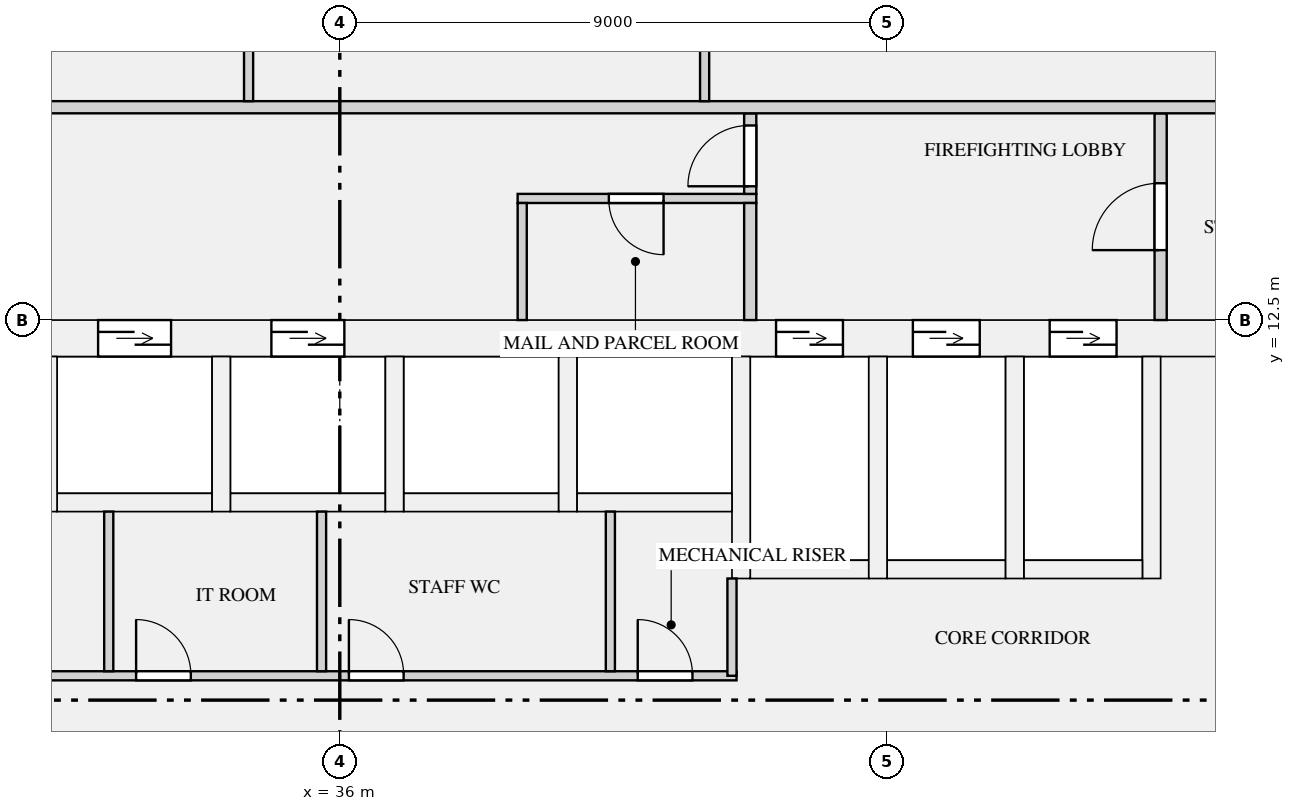
"""IFC4 building model, lengths in metres.
Left out: names, types, materials, properties, quantities, classifications, styles, units other than length and angle.
Written with IfcOpenShell. Run it as: python <this file> out.ifc"""

import sys

from ifc_helpers import new_model, si_unit, direction, frame, frame_2d, origin, place, context, subcontext, project, spatial, rectangle, extrude, element, fill, save


model = new_model("IFC4")
c1 = context("Model", 3, precision=1e-05, world=origin(), true_north=direction((0.0, 1.0)))
c2 = subcontext(c1, "Body", "Model", "MODEL_VIEW")
j1 = project(units=[si_unit("LENGTHUNIT", "METRE"), si_unit("PLANEANGLEUNIT", "RADIAN")], contexts=[c1])
p1 = place(None, origin())
s1 = spatial("IfcSite", under=j1, at=p1, CompositionType="ELEMENT")
p2 = place(p1, origin())
s2 = spatial("IfcBuilding", under=s1, at=p2, CompositionType="ELEMENT")
p3 = place(p2, frame((0.0, 0.0, 69.9)))
s3 = spatial("IfcBuildingStorey", under=s2, at=p3, CompositionType="ELEMENT", Elevation=69.9)
p4 = place(p3, frame((19.0, 12.2, 0.0), z_axis=(0.0, 0.0, 1.0), x_axis=(1.0, 0.0, 0.0)))
e1 = element("IfcWall", 1, at=p4, inside=s3, PredefinedType="SHEAR", context=c2, shape_type="SweptSolid", body=[
    extrude(rectangle(XDim=34.0, YDim=0.6, at=frame_2d((17.0, 0.0))), origin(), (0.0, 0.0, 1.0), 3.15),
])
p5 = place(p4, frame((4.475, 0.0, 0.0)))
e2 = element("IfcOpeningElement", 2, at=p5, cuts=e1, PredefinedType="OPENING", context=c2, shape_type="SweptSolid", body=[
    extrude(rectangle(XDim=1.2, YDim=2.1, at=frame_2d((0.6, 1.05))), frame((0.0, 0.31, 0.0), z_axis=(0.0, -1.0, 0.0), x_axis=(1.0, 0.0, 0.0)), (0.0, 0.0, 1.0), 0.62),
])
p6 = place(p4, frame((7.325, 0.0, 0.0)))
e3 = element("IfcOpeningElement", 3, at=p6, cuts=e1, PredefinedType="OPENING", context=c2, shape_type="SweptSolid", body=[
    extrude(rectangle(XDim=1.2, YDim=2.1, at=frame_2d((0.6, 1.05))), frame((0.0, 0.31, 0.0), z_axis=(0.0, -1.0, 0.0), x_axis=(1.0, 0.0, 0.0)), (0.0, 0.0, 1.0), 0.62),
])
p7 = place(p4, frame((10.175, 0.0, 0.0)))
e4 = element("IfcOpeningElement", 4, at=p7, cuts=e1, PredefinedType="OPENING", context=c2, shape_type="SweptSolid", body=[
    extrude(rectangle(XDim=1.2, YDim=2.1, at=frame_2d((0.6, 1.05))), frame((0.0, 0.31, 0.0), z_axis=(0.0, -1.0, 0.0), x_axis=(1.0, 0.0, 0.0)), (0.0, 0.0, 1.0), 0.62),
])
p8 = place(p4, frame((13.025, 0.0, 0.0)))
e5 = element("IfcOpeningElement", 5, at=p8, cuts=e1, PredefinedType="OPENING", context=c2, shape_type="SweptSolid", body=[
    extrude(rectangle(XDim=1.2, YDim=2.1, at=frame_2d((0.6, 1.05))), frame((0.0, 0.31, 0.0), z_axis=(0.0, -1.0, 0.0), x_axis=(1.0, 0.0, 0.0)), (0.0, 0.0, 1.0), 0.62),
])
p9 = place(p4, frame((15.875, 0.0, 0.0)))
e6 = element("IfcOpeningElement", 6, at=p9, cuts=e1, PredefinedType="OPENING", context=c2, shape_type="SweptSolid", body=[
    extrude(rectangle(XDim=1.2, YDim=2.1, at=frame_2d((0.6, 1.05))), frame((0.0, 0.31, 0.0), z_axis=(0.0, -1.0, 0.0), x_axis=(1.0, 0.0, 0.0)), (0.0, 0.0, 1.0), 0.62),
])
p10 = place(p4, frame((24.175, 0.0, 0.0)))
e7 = element("IfcOpeningElement", 7, at=p10, cuts=e1, PredefinedType="OPENING", context=c2, shape_type="SweptSolid", body=[
    extrude(rectangle(XDim=1.1, YDim=2.1, at=frame_2d((0.55, 1.05))), frame((0.0, 0.31, 0.0), z_axis=(0.0, -1.0, 0.0), x_axis=(1.0, 0.0, 0.0)), (0.0, 0.0, 1.0), 0.62),
])
p11 = place(p4, frame((26.425, 0.0, 0.0)))
e8 = element("IfcOpeningElement", 8, at=p11, cuts=e1, PredefinedType="OPENING", context=c2, shape_type="SweptSolid", body=[
    extrude(rectangle(XDim=1.1, YDim=2.1, at=frame_2d((0.55, 1.05))), frame((0.0, 0.31, 0.0), z_axis=(0.0, -1.0, 0.0), x_axis=(1.0, 0.0, 0.0)), (0.0, 0.0, 1.0), 0.62),
])
p12 = place(p4, frame((28.675, 0.0, 0.0)))
e9 = element("IfcOpeningElement", 9, at=p12, cuts=e1, PredefinedType="OPENING", context=c2, shape_type="SweptSolid", body=[
    extrude(rectangle(XDim=1.1, YDim=2.1, at=frame_2d((0.55, 1.05))), frame((0.0, 0.31, 0.0), z_axis=(0.0, -1.0, 0.0), x_axis=(1.0, 0.0, 0.0)), (0.0, 0.0, 1.0), 0.62),
])
p13 = place(p4, frame((1.15, 0.0, 0.0)))
e10 = element("IfcOpeningElement", 10, at=p13, cuts=e1, PredefinedType="OPENING", context=c2, shape_type="SweptSolid", body=[
    extrude(rectangle(XDim=1.2, YDim=2.1, at=frame_2d((0.6, 1.05))), frame((0.0, 0.31, 0.0), z_axis=(0.0, -1.0, 0.0), x_axis=(1.0, 0.0, 0.0)), (0.0, 0.0, 1.0), 0.62),
])
p14 = place(p4, frame((31.65, 0.0, 0.0)))
e11 = element("IfcOpeningElement", 11, at=p14, cuts=e1, PredefinedType="OPENING", context=c2, shape_type="SweptSolid", body=[
    extrude(rectangle(XDim=1.2, YDim=2.1, at=frame_2d((0.6, 1.05))), frame((0.0, 0.31, 0.0), z_axis=(0.0, -1.0, 0.0), x_axis=(1.0, 0.0, 0.0)), (0.0, 0.0, 1.0), 0.62),
])
for number, where, z_axis, x_axis in (
    (12, (31.35, 9.5, 0.0), (0.0, 0.0, 1.0), (1.0, 0.0, 0.0)),
    (13, (31.2, 9.35, 0.0), (0.0, 0.0, 1.0), (0.0, 1.0, 0.0)),
):
    element("IfcWall", number, at=place(p3, frame(where, z_axis=z_axis, x_axis=x_axis)), inside=s3, PredefinedType="SHEAR", context=c2, shape_type="SweptSolid", body=[
        extrude(rectangle(XDim=2.55, YDim=0.3, at=frame_2d((1.275, 0.0))), origin(), (0.0, 0.0, 1.0), 3.15),
    ])
p15 = place(p3, frame((34.2, 9.5, 0.0), z_axis=(0.0, 0.0, 1.0), x_axis=(1.0, 0.0, 0.0)))
e14 = element("IfcWall", 14, at=p15, inside=s3, PredefinedType="SHEAR", context=c2, shape_type="SweptSolid", body=[
    extrude(rectangle(XDim=2.55, YDim=0.3, at=frame_2d((1.275, 0.0))), origin(), (0.0, 0.0, 1.0), 3.15),
])
p16 = place(p3, frame((34.05, 9.35, 0.0), z_axis=(0.0, 0.0, 1.0), x_axis=(0.0, 1.0, 0.0)))
e15 = element("IfcWall", 15, at=p16, inside=s3, PredefinedType="SHEAR", context=c2, shape_type="SweptSolid", body=[
    extrude(rectangle(XDim=2.55, YDim=0.3, at=frame_2d((1.275, 0.0))), origin(), (0.0, 0.0, 1.0), 3.15),
])
p17 = place(p3, frame((37.05, 9.5, 0.0), z_axis=(0.0, 0.0, 1.0), x_axis=(1.0, 0.0, 0.0)))
e16 = element("IfcWall", 16, at=p17, inside=s3, PredefinedType="SHEAR", context=c2, shape_type="SweptSolid", body=[
    extrude(rectangle(XDim=2.55, YDim=0.3, at=frame_2d((1.275, 0.0))), origin(), (0.0, 0.0, 1.0), 3.15),
])
p18 = place(p3, frame((36.9, 9.35, 0.0), z_axis=(0.0, 0.0, 1.0), x_axis=(0.0, 1.0, 0.0)))
e17 = element("IfcWall", 17, at=p18, inside=s3, PredefinedType="SHEAR", context=c2, shape_type="SweptSolid", body=[
    extrude(rectangle(XDim=2.55, YDim=0.3, at=frame_2d((1.275, 0.0))), origin(), (0.0, 0.0, 1.0), 3.15),
])
p19 = place(p3, frame((39.9, 9.5, 0.0), z_axis=(0.0, 0.0, 1.0), x_axis=(1.0, 0.0, 0.0)))
e18 = element("IfcWall", 18, at=p19, inside=s3, PredefinedType="SHEAR", context=c2, shape_type="SweptSolid", body=[
    extrude(rectangle(XDim=2.55, YDim=0.3, at=frame_2d((1.275, 0.0))), origin(), (0.0, 0.0, 1.0), 3.15),
])
p20 = place(p3, frame((39.75, 9.35, 0.0), z_axis=(0.0, 0.0, 1.0), x_axis=(0.0, 1.0, 0.0)))
e19 = element("IfcWall", 19, at=p20, inside=s3, PredefinedType="SHEAR", context=c2, shape_type="SweptSolid", body=[
    extrude(rectangle(XDim=2.55, YDim=0.3, at=frame_2d((1.275, 0.0))), origin(), (0.0, 0.0, 1.0), 3.15),
])
p21 = place(p3, frame((42.75, 8.4, 0.0), z_axis=(0.0, 0.0, 1.0), x_axis=(1.0, 0.0, 0.0)))
e20 = element("IfcWall", 20, at=p21, inside=s3, PredefinedType="SHEAR", context=c2, shape_type="SweptSolid", body=[
    extrude(rectangle(XDim=1.95, YDim=0.3, at=frame_2d((0.975, 0.0))), origin(), (0.0, 0.0, 1.0), 3.15),
])
p22 = place(p3, frame((42.6, 8.25, 0.0), z_axis=(0.0, 0.0, 1.0), x_axis=(0.0, 1.0, 0.0)))
e21 = element("IfcWall", 21, at=p22, inside=s3, PredefinedType="SHEAR", context=c2, shape_type="SweptSolid", body=[
    extrude(rectangle(XDim=3.65, YDim=0.3, at=frame_2d((1.825, 0.0))), origin(), (0.0, 0.0, 1.0), 3.15),
])
p23 = place(p3, frame((45.0, 8.4, 0.0), z_axis=(0.0, 0.0, 1.0), x_axis=(1.0, 0.0, 0.0)))
e22 = element("IfcWall", 22, at=p23, inside=s3, PredefinedType="SHEAR", context=c2, shape_type="SweptSolid", body=[
    extrude(rectangle(XDim=1.95, YDim=0.3, at=frame_2d((0.975, 0.0))), origin(), (0.0, 0.0, 1.0), 3.15),
])
p24 = place(p3, frame((44.85, 8.25, 0.0), z_axis=(0.0, 0.0, 1.0), x_axis=(0.0, 1.0, 0.0)))
e23 = element("IfcWall", 23, at=p24, inside=s3, PredefinedType="SHEAR", context=c2, shape_type="SweptSolid", body=[
    extrude(rectangle(XDim=3.65, YDim=0.3, at=frame_2d((1.825, 0.0))), origin(), (0.0, 0.0, 1.0), 3.15),
])
p25 = place(p3, frame((47.25, 8.4, 0.0), z_axis=(0.0, 0.0, 1.0), x_axis=(1.0, 0.0, 0.0)))
e24 = element("IfcWall", 24, at=p25, inside=s3, PredefinedType="SHEAR", context=c2, shape_type="SweptSolid", body=[
    extrude(rectangle(XDim=1.95, YDim=0.3, at=frame_2d((0.975, 0.0))), origin(), (0.0, 0.0, 1.0), 3.15),
])
for number, where, z_axis, x_axis in (
    (25, (47.1, 8.25, 0.0), (0.0, 0.0, 1.0), (0.0, 1.0, 0.0)),
    (26, (49.35, 8.25, 0.0), (0.0, 0.0, 1.0), (0.0, 1.0, 0.0)),
):
    element("IfcWall", number, at=place(p3, frame(where, z_axis=z_axis, x_axis=x_axis)), inside=s3, PredefinedType="SHEAR", context=c2, shape_type="SweptSolid", body=[
        extrude(rectangle(XDim=3.65, YDim=0.3, at=frame_2d((1.825, 0.0))), origin(), (0.0, 0.0, 1.0), 3.15),
    ])
p26 = place(p3, frame((22.125, 6.65, 0.0), z_axis=(0.0, 0.0, 1.0), x_axis=(1.0, 0.0, 0.0)))
e27 = element("IfcWall", 27, at=p26, inside=s3, PredefinedType="PARTITIONING", context=c2, shape_type="SweptSolid", body=[
    extrude(rectangle(XDim=20.4, YDim=0.15, at=frame_2d((10.2, 0.0))), origin(), (0.0, 0.0, 1.0), 2.65),
])
p27 = place(p26, frame((0.525, 0.0, 0.0)))
e28 = element("IfcOpeningElement", 28, at=p27, cuts=e27, PredefinedType="OPENING", context=c2, shape_type="SweptSolid", body=[
    extrude(rectangle(XDim=0.9, YDim=2.1, at=frame_2d((0.45, 1.05))), frame((0.0, 0.085, 0.0), z_axis=(0.0, -1.0, 0.0), x_axis=(1.0, 0.0, 0.0)), (0.0, 0.0, 1.0), 0.17),
])
p28 = place(p26, frame((5.025, 0.0, 0.0)))
e29 = element("IfcOpeningElement", 29, at=p28, cuts=e27, PredefinedType="OPENING", context=c2, shape_type="SweptSolid", body=[
    extrude(rectangle(XDim=0.9, YDim=2.1, at=frame_2d((0.45, 1.05))), frame((0.0, 0.085, 0.0), z_axis=(0.0, -1.0, 0.0), x_axis=(1.0, 0.0, 0.0)), (0.0, 0.0, 1.0), 0.17),
])
p29 = place(p26, frame((10.525, 0.0, 0.0)))
e30 = element("IfcOpeningElement", 30, at=p29, cuts=e27, PredefinedType="OPENING", context=c2, shape_type="SweptSolid", body=[
    extrude(rectangle(XDim=0.9, YDim=2.1, at=frame_2d((0.45, 1.05))), frame((0.0, 0.085, 0.0), z_axis=(0.0, -1.0, 0.0), x_axis=(1.0, 0.0, 0.0)), (0.0, 0.0, 1.0), 0.17),
])
p30 = place(p26, frame((14.025, 0.0, 0.0)))
e31 = element("IfcOpeningElement", 31, at=p30, cuts=e27, PredefinedType="OPENING", context=c2, shape_type="SweptSolid", body=[
    extrude(rectangle(XDim=0.9, YDim=2.1, at=frame_2d((0.45, 1.05))), frame((0.0, 0.085, 0.0), z_axis=(0.0, -1.0, 0.0), x_axis=(1.0, 0.0, 0.0)), (0.0, 0.0, 1.0), 0.17),
])
p31 = place(p26, frame((18.775, 0.0, 0.0)))
e32 = element("IfcOpeningElement", 32, at=p31, cuts=e27, PredefinedType="OPENING", context=c2, shape_type="SweptSolid", body=[
    extrude(rectangle(XDim=0.9, YDim=2.1, at=frame_2d((0.45, 1.05))), frame((0.0, 0.085, 0.0), z_axis=(0.0, -1.0, 0.0), x_axis=(1.0, 0.0, 0.0)), (0.0, 0.0, 1.0), 0.17),
])
p32 = place(p3, frame((38.925, 14.5, 0.0), z_axis=(0.0, 0.0, 1.0), x_axis=(1.0, 0.0, 0.0)))
e33 = element("IfcWall", 33, at=p32, inside=s3, PredefinedType="PARTITIONING", context=c2, shape_type="SweptSolid", body=[
    extrude(rectangle(XDim=3.925, YDim=0.15, at=frame_2d((1.962, 0.0))), origin(), (0.0, 0.0, 1.0), 2.65),
])
p33 = place(p32, frame((1.5, 0.0, 0.0)))
e34 = element("IfcOpeningElement", 34, at=p33, cuts=e33, PredefinedType="OPENING", context=c2, shape_type="SweptSolid", body=[
    extrude(rectangle(XDim=0.9, YDim=2.1, at=frame_2d((0.45, 1.05))), frame((0.0, 0.085, 0.0), z_axis=(0.0, -1.0, 0.0), x_axis=(1.0, 0.0, 0.0)), (0.0, 0.0, 1.0), 0.17),
])
p34 = place(p3, frame((42.45, 6.65, 0.0), z_axis=(0.0, 0.0, 1.0), x_axis=(0.0, 1.0, 0.0)))
e35 = element("IfcWall", 35, at=p34, inside=s3, PredefinedType="PARTITIONING", context=c2, shape_type="SweptSolid", body=[
    extrude(rectangle(XDim=1.6, YDim=0.15, at=frame_2d((0.8, 0.0))), origin(), (0.0, 0.0, 1.0), 2.65),
])
for number, where, z_axis, x_axis in (
    (36, (32.2, 6.725, 0.0), (0.0, 0.0, 1.0), (0.0, 1.0, 0.0)),
    (37, (35.7, 6.725, 0.0), (0.0, 0.0, 1.0), (0.0, 1.0, 0.0)),
    (38, (40.45, 6.725, 0.0), (0.0, 0.0, 1.0), (0.0, 1.0, 0.0)),
):
    element("IfcWall", number, at=place(p3, frame(where, z_axis=z_axis, x_axis=x_axis)), inside=s3, PredefinedType="PARTITIONING", context=c2, shape_type="SweptSolid", body=[
        extrude(rectangle(XDim=2.625, YDim=0.15, at=frame_2d((1.312, 0.0))), origin(), (0.0, 0.0, 1.0), 2.65),
    ])
p35 = place(p3, frame((39.0, 12.5, 0.0), z_axis=(0.0, 0.0, 1.0), x_axis=(0.0, 1.0, 0.0)))
e39 = element("IfcWall", 39, at=p35, inside=s3, PredefinedType="PARTITIONING", context=c2, shape_type="SweptSolid", body=[
    extrude(rectangle(XDim=1.925, YDim=0.15, at=frame_2d((0.962, 0.0))), origin(), (0.0, 0.0, 1.0), 2.65),
])
p36 = place(p3, frame((42.75, 12.5, 0.0), z_axis=(0.0, 0.0, 1.0), x_axis=(0.0, 1.0, 0.0)))
e40 = element("IfcWall", 40, at=p36, inside=s3, PredefinedType="PARTITIONING", context=c2, shape_type="SweptSolid", body=[
    extrude(rectangle(XDim=1.925, YDim=0.2, at=frame_2d((0.962, 0.0))), origin(), (0.0, 0.0, 1.0), 2.65),
])
p37 = place(p3, frame((49.5, 12.5, 0.0), z_axis=(0.0, 0.0, 1.0), x_axis=(0.0, 1.0, 0.0)))
e41 = element("IfcWall", 41, at=p37, inside=s3, PredefinedType="PARTITIONING", context=c2, shape_type="SweptSolid", body=[
    extrude(rectangle(XDim=3.4, YDim=0.2, at=frame_2d((1.7, 0.0))), origin(), (0.0, 0.0, 1.0), 2.65),
])
p38 = place(p37, frame((1.15, 0.0, 0.0)))
e42 = element("IfcOpeningElement", 42, at=p38, cuts=e41, PredefinedType="OPENING", context=c2, shape_type="SweptSolid", body=[
    extrude(rectangle(XDim=1.1, YDim=2.1, at=frame_2d((0.55, 1.05))), frame((0.0, 0.11, 0.0), z_axis=(0.0, -1.0, 0.0), x_axis=(1.0, 0.0, 0.0)), (0.0, 0.0, 1.0), 0.22),
])
p39 = place(p3, frame((42.75, 14.575, 0.0), z_axis=(0.0, 0.0, 1.0), x_axis=(0.0, 1.0, 0.0)))
e43 = element("IfcWall", 43, at=p39, inside=s3, PredefinedType="PARTITIONING", context=c2, shape_type="SweptSolid", body=[
    extrude(rectangle(XDim=1.325, YDim=0.2, at=frame_2d((0.663, 0.0))), origin(), (0.0, 0.0, 1.0), 2.65),
])
p40 = place(p39, frame((0.125, 0.0, 0.0)))
e44 = element("IfcOpeningElement", 44, at=p40, cuts=e43, PredefinedType="OPENING", context=c2, shape_type="SweptSolid", body=[
    extrude(rectangle(XDim=1.0, YDim=2.1, at=frame_2d((0.5, 1.05))), frame((0.0, 0.11, 0.0), z_axis=(0.0, -1.0, 0.0), x_axis=(1.0, 0.0, 0.0)), (0.0, 0.0, 1.0), 0.22),
])
p41 = place(p3, frame((17.9, 16.0, 0.0), z_axis=(0.0, 0.0, 1.0), x_axis=(1.0, 0.0, 0.0)))
e45 = element("IfcWall", 45, at=p41, inside=s3, PredefinedType="PARTITIONING", context=c2, shape_type="SweptSolid", body=[
    extrude(rectangle(XDim=36.2, YDim=0.2, at=frame_2d((18.1, 0.0))), origin(), (0.0, 0.0, 1.0), 2.65),
])
p42 = place(p41, frame((0.9, 0.0, 0.0)))
e46 = element("IfcOpeningElement", 46, at=p42, cuts=e45, PredefinedType="OPENING", context=c2, shape_type="SweptSolid", body=[
    extrude(rectangle(XDim=1.4, YDim=2.1, at=frame_2d((0.7, 1.05))), frame((0.0, 0.11, 0.0), z_axis=(0.0, -1.0, 0.0), x_axis=(1.0, 0.0, 0.0)), (0.0, 0.0, 1.0), 0.22),
])
p43 = place(p41, frame((33.9, 0.0, 0.0)))
e47 = element("IfcOpeningElement", 47, at=p43, cuts=e45, PredefinedType="OPENING", context=c2, shape_type="SweptSolid", body=[
    extrude(rectangle(XDim=1.4, YDim=2.1, at=frame_2d((0.7, 1.05))), frame((0.0, 0.11, 0.0), z_axis=(0.0, -1.0, 0.0), x_axis=(1.0, 0.0, 0.0)), (0.0, 0.0, 1.0), 0.22),
])
for number, where, z_axis, x_axis in (
    (48, (34.5, 16.1, 0.0), (0.0, 0.0, 1.0), (0.0, 1.0, 0.0)),
    (49, (42.0, 16.1, 0.0), (0.0, 0.0, 1.0), (0.0, 1.0, 0.0)),
):
    element("IfcWall", number, at=place(p3, frame(where, z_axis=z_axis, x_axis=x_axis)), inside=s3, PredefinedType="PARTITIONING", context=c2, shape_type="SweptSolid", body=[
        extrude(rectangle(XDim=4.825, YDim=0.15, at=frame_2d((2.413, 0.0))), origin(), (0.0, 0.0, 1.0), 2.65),
    ])
p44 = place(p8, origin())
e50 = element("IfcDoor", 50, at=p44, inside=s3, OperationType="DOUBLE_DOOR_SLIDING", PredefinedType="DOOR", context=c2, shape_type="SweptSolid", body=[
    extrude(rectangle(XDim=1.2, YDim=2.1, at=frame_2d((0.6, 1.05))), frame((0.0, 0.025, 0.0), z_axis=(0.0, -1.0, 0.0), x_axis=(1.0, 0.0, 0.0)), (0.0, 0.0, 1.0), 0.05),
])
fill(e5, e50)
p45 = place(p9, origin())
e51 = element("IfcDoor", 51, at=p45, inside=s3, OperationType="DOUBLE_DOOR_SLIDING", PredefinedType="DOOR", context=c2, shape_type="SweptSolid", body=[
    extrude(rectangle(XDim=1.2, YDim=2.1, at=frame_2d((0.6, 1.05))), frame((0.0, 0.025, 0.0), z_axis=(0.0, -1.0, 0.0), x_axis=(1.0, 0.0, 0.0)), (0.0, 0.0, 1.0), 0.05),
])
fill(e6, e51)
p46 = place(p10, origin())
e52 = element("IfcDoor", 52, at=p46, inside=s3, OperationType="DOUBLE_DOOR_SLIDING", PredefinedType="DOOR", context=c2, shape_type="SweptSolid", body=[
    extrude(rectangle(XDim=1.1, YDim=2.1, at=frame_2d((0.55, 1.05))), frame((0.0, 0.025, 0.0), z_axis=(0.0, -1.0, 0.0), x_axis=(1.0, 0.0, 0.0)), (0.0, 0.0, 1.0), 0.05),
])
fill(e7, e52)
p47 = place(p11, origin())
e53 = element("IfcDoor", 53, at=p47, inside=s3, OperationType="DOUBLE_DOOR_SLIDING", PredefinedType="DOOR", context=c2, shape_type="SweptSolid", body=[
    extrude(rectangle(XDim=1.1, YDim=2.1, at=frame_2d((0.55, 1.05))), frame((0.0, 0.025, 0.0), z_axis=(0.0, -1.0, 0.0), x_axis=(1.0, 0.0, 0.0)), (0.0, 0.0, 1.0), 0.05),
])
fill(e8, e53)
p48 = place(p12, origin())
e54 = element("IfcDoor", 54, at=p48, inside=s3, OperationType="DOUBLE_DOOR_SLIDING", PredefinedType="DOOR", context=c2, shape_type="SweptSolid", body=[
    extrude(rectangle(XDim=1.1, YDim=2.1, at=frame_2d((0.55, 1.05))), frame((0.0, 0.025, 0.0), z_axis=(0.0, -1.0, 0.0), x_axis=(1.0, 0.0, 0.0)), (0.0, 0.0, 1.0), 0.05),
])
fill(e9, e54)
p49 = place(p29, origin())
e55 = element("IfcDoor", 55, at=p49, inside=s3, OperationType="SINGLE_SWING_LEFT", PredefinedType="DOOR", context=c2, shape_type="SweptSolid", body=[
    extrude(rectangle(XDim=0.9, YDim=2.1, at=frame_2d((0.45, 1.05))), frame((0.0, 0.025, 0.0), z_axis=(0.0, -1.0, 0.0), x_axis=(1.0, 0.0, 0.0)), (0.0, 0.0, 1.0), 0.05),
])
fill(e30, e55)
p50 = place(p30, origin())
e56 = element("IfcDoor", 56, at=p50, inside=s3, OperationType="SINGLE_SWING_LEFT", PredefinedType="DOOR", context=c2, shape_type="SweptSolid", body=[
    extrude(rectangle(XDim=0.9, YDim=2.1, at=frame_2d((0.45, 1.05))), frame((0.0, 0.025, 0.0), z_axis=(0.0, -1.0, 0.0), x_axis=(1.0, 0.0, 0.0)), (0.0, 0.0, 1.0), 0.05),
])
fill(e31, e56)
p51 = place(p31, origin())
e57 = element("IfcDoor", 57, at=p51, inside=s3, OperationType="SINGLE_SWING_LEFT", PredefinedType="DOOR", context=c2, shape_type="SweptSolid", body=[
    extrude(rectangle(XDim=0.9, YDim=2.1, at=frame_2d((0.45, 1.05))), frame((0.0, 0.025, 0.0), z_axis=(0.0, -1.0, 0.0), x_axis=(1.0, 0.0, 0.0)), (0.0, 0.0, 1.0), 0.05),
])
fill(e32, e57)
p52 = place(p33, frame((0.9, 0.0, 0.0), z_axis=(0.0, 0.0, 1.0), x_axis=(-1.0, 0.0, 0.0)))
e58 = element("IfcDoor", 58, at=p52, inside=s3, OperationType="SINGLE_SWING_LEFT", PredefinedType="DOOR", context=c2, shape_type="SweptSolid", body=[
    extrude(rectangle(XDim=0.9, YDim=2.1, at=frame_2d((0.45, 1.05))), frame((0.0, 0.025, 0.0), z_axis=(0.0, -1.0, 0.0), x_axis=(1.0, 0.0, 0.0)), (0.0, 0.0, 1.0), 0.05),
])
fill(e34, e58)
p53 = place(p40, origin())
e59 = element("IfcDoor", 59, at=p53, inside=s3, OperationType="SINGLE_SWING_LEFT", PredefinedType="DOOR", context=c2, shape_type="SweptSolid", body=[
    extrude(rectangle(XDim=1.0, YDim=2.1, at=frame_2d((0.5, 1.05))), frame((0.0, 0.025, 0.0), z_axis=(0.0, -1.0, 0.0), x_axis=(1.0, 0.0, 0.0)), (0.0, 0.0, 1.0), 0.05),
])
fill(e44, e59)
p54 = place(p38, origin())
e60 = element("IfcDoor", 60, at=p54, inside=s3, OperationType="SINGLE_SWING_LEFT", PredefinedType="DOOR", context=c2, shape_type="SweptSolid", body=[
    extrude(rectangle(XDim=1.1, YDim=2.1, at=frame_2d((0.55, 1.05))), frame((0.0, 0.025, 0.0), z_axis=(0.0, -1.0, 0.0), x_axis=(1.0, 0.0, 0.0)), (0.0, 0.0, 1.0), 0.05),
])
fill(e42, e60)
save(model, sys.argv[1])
